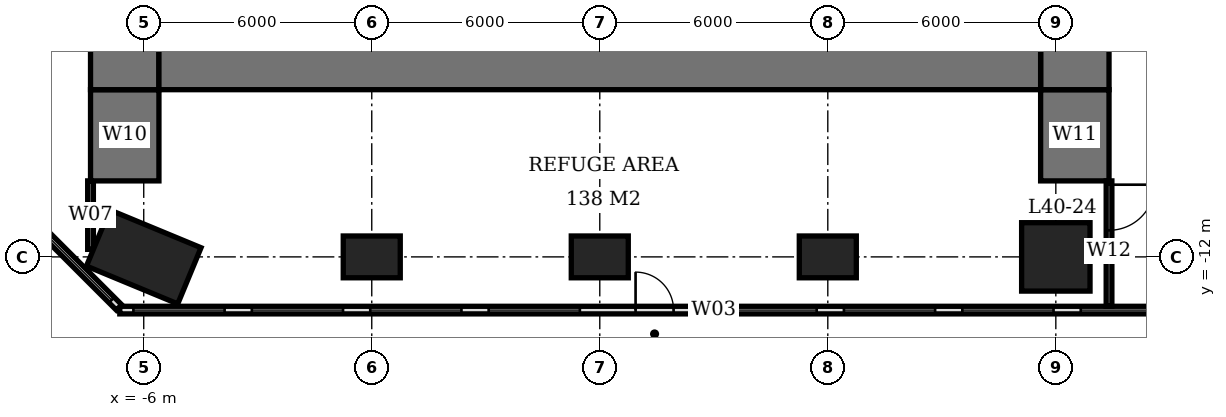
"""IFC4 building model, lengths in metres.
Left out: names, types, materials, properties, quantities, classifications, styles, units other than length and angle.
Written with IfcOpenShell. Run it as: python <this file> out.ifc"""

import sys

from ifc_helpers import new_model, si_unit, direction, frame, frame_2d, origin, origin_2d, place, context, subcontext, project, spatial, rectangle, extrude, element, fill, save


model = new_model("IFC4")
c1 = context("Model", 3, precision=1e-05, world=origin(), true_north=direction((0.0, 1.0)))
c2 = subcontext(c1, "Body", "Model", "MODEL_VIEW")
j1 = project(units=[si_unit("LENGTHUNIT", "METRE"), si_unit("PLANEANGLEUNIT", "RADIAN")], contexts=[c1])
p1 = place(None, origin())
s1 = spatial("IfcSite", under=j1, at=p1, CompositionType="ELEMENT")
p2 = place(p1, origin())
s2 = spatial("IfcBuilding", under=s1, at=p2, CompositionType="ELEMENT")
p3 = place(p2, frame((0.0, 0.0, 164.0)))
s3 = spatial("IfcBuildingStorey", under=s2, at=p3, CompositionType="ELEMENT", Elevation=164.0)
p4 = place(p3, frame((-6.0, -12.0, 0.0), z_axis=(0.0, 0.0, 1.0), x_axis=(-0.923879532511, 0.382683432365, 0.0)))
e1 = element("IfcColumn", 1, at=p4, inside=s3, PredefinedType="COLUMN", context=c2, shape_type="SweptSolid", body=[
    extrude(rectangle(XDim=2.6, YDim=1.6, at=origin_2d()), origin(), (0.0, 0.0, 1.0), 5.4),
])
for number, where, z_axis, x_axis in (
    (2, (0.0, -12.0, 0.0), (0.0, 0.0, 1.0), (1.0, 0.0, 0.0)),
    (3, (6.0, -12.0, 0.0), (0.0, 0.0, 1.0), (1.0, 0.0, 0.0)),
    (4, (12.0, -12.0, 0.0), (0.0, 0.0, 1.0), (1.0, 0.0, 0.0)),
):
    element("IfcColumn", number, at=place(p3, frame(where, z_axis=z_axis, x_axis=x_axis)), inside=s3, PredefinedType="COLUMN", context=c2, shape_type="SweptSolid", body=[
        extrude(rectangle(XDim=1.5, YDim=1.1, at=origin_2d()), origin(), (0.0, 0.0, 1.0), 5.4),
    ])
p5 = place(p3, frame((18.0, -12.0, 0.0), z_axis=(0.0, 0.0, 1.0), x_axis=(1.0, 0.0, 0.0)))
e5 = element("IfcColumn", 5, at=p5, inside=s3, PredefinedType="COLUMN", context=c2, shape_type="SweptSolid", body=[
    extrude(rectangle(XDim=1.8, YDim=1.8, at=origin_2d()), origin(), (0.0, 0.0, 1.0), 5.4),
])
p6 = place(p3, frame((-5.6, -6.6, 0.0), z_axis=(0.0, 0.0, 1.0), x_axis=(1.0, 0.0, 0.0)))
e6 = element("IfcWall", 6, at=p6, inside=s3, PredefinedType="SHEAR", context=c2, shape_type="SweptSolid", body=[
    extrude(rectangle(XDim=23.2, YDim=2.0, at=frame_2d((11.6, 0.0))), origin(), (0.0, 0.0, 1.0), 5.4),
])
p7 = place(p3, frame((-6.5, -7.6, 0.0), z_axis=(0.0, 0.0, 1.0), x_axis=(0.0, 1.0, 0.0)))
e7 = element("IfcWall", 7, at=p7, inside=s3, PredefinedType="SHEAR", context=c2, shape_type="SweptSolid", body=[
    extrude(rectangle(XDim=21.2, YDim=1.8, at=frame_2d((10.6, 0.0))), origin(), (0.0, 0.0, 1.0), 5.4),
])
p8 = place(p7, frame((7.8, 0.0, 0.0)))
e8 = element("IfcOpeningElement", 8, at=p8, cuts=e7, PredefinedType="OPENING", context=c2, shape_type="SweptSolid", body=[
    extrude(rectangle(XDim=1.8, YDim=2.4, at=frame_2d((0.9, 1.2))), frame((0.0, 0.91, 0.0), z_axis=(0.0, -1.0, 0.0), x_axis=(1.0, 0.0, 0.0)), (0.0, 0.0, 1.0), 1.82),
])
p9 = place(p3, frame((18.5, -7.6, 0.0), z_axis=(0.0, 0.0, 1.0), x_axis=(0.0, 1.0, 0.0)))
e9 = element("IfcWall", 9, at=p9, inside=s3, PredefinedType="SHEAR", context=c2, shape_type="SweptSolid", body=[
    extrude(rectangle(XDim=21.2, YDim=1.8, at=frame_2d((10.6, 0.0))), origin(), (0.0, 0.0, 1.0), 5.4),
])
p10 = place(p9, frame((9.2, 0.0, 0.0)))
e10 = element("IfcOpeningElement", 10, at=p10, cuts=e9, PredefinedType="OPENING", context=c2, shape_type="SweptSolid", body=[
    extrude(rectangle(XDim=1.8, YDim=2.4, at=frame_2d((0.9, 1.2))), frame((0.0, 0.91, 0.0), z_axis=(0.0, -1.0, 0.0), x_axis=(1.0, 0.0, 0.0)), (0.0, 0.0, 1.0), 1.82),
])
for number, where, z_axis, x_axis in (
    (11, (-6.5, -10.0, 0.0), (0.0, 0.0, 1.0), (0.0, 1.0, 0.0)),
    (12, (18.5, -10.0, 0.0), (0.0, 0.0, 1.0), (0.0, 1.0, 0.0)),
):
    element("IfcWall", number, at=place(p3, frame(where, z_axis=z_axis, x_axis=x_axis)), inside=s3, PredefinedType="SHEAR", context=c2, shape_type="SweptSolid", body=[
        extrude(rectangle(XDim=2.4, YDim=1.8, at=frame_2d((1.2, 0.0))), origin(), (0.0, 0.0, 1.0), 5.4),
    ])
p11 = place(p3, frame((-6.63, -13.4, 0.0), z_axis=(0.0, 0.0, 1.0), x_axis=(1.0, 0.0, 0.0)))
e13 = element("IfcWall", 13, at=p11, inside=s3, PredefinedType="USERDEFINED", context=c2, shape_type="SweptSolid", body=[
    extrude(rectangle(XDim=31.26, YDim=0.2, at=frame_2d((15.63, 0.0))), origin(), (0.0, 0.0, 1.0), 5.4),
])
p12 = place(p11, frame((0.358, 0.0, 0.6)))
e14 = element("IfcOpeningElement", 14, at=p12, cuts=e13, PredefinedType="OPENING", context=c2, shape_type="SweptSolid", body=[
    extrude(rectangle(XDim=2.4, YDim=3.0, at=frame_2d((1.2, 1.5))), frame((0.0, 0.11, 0.0), z_axis=(0.0, -1.0, 0.0), x_axis=(1.0, 0.0, 0.0)), (0.0, 0.0, 1.0), 0.22),
])
p13 = place(p11, frame((3.474, 0.0, 0.6)))
e15 = element("IfcOpeningElement", 15, at=p13, cuts=e13, PredefinedType="OPENING", context=c2, shape_type="SweptSolid", body=[
    extrude(rectangle(XDim=2.4, YDim=3.0, at=frame_2d((1.2, 1.5))), frame((0.0, 0.11, 0.0), z_axis=(0.0, -1.0, 0.0), x_axis=(1.0, 0.0, 0.0)), (0.0, 0.0, 1.0), 0.22),
])
p14 = place(p11, frame((6.59, 0.0, 0.6)))
e16 = element("IfcOpeningElement", 16, at=p14, cuts=e13, PredefinedType="OPENING", context=c2, shape_type="SweptSolid", body=[
    extrude(rectangle(XDim=2.4, YDim=3.0, at=frame_2d((1.2, 1.5))), frame((0.0, 0.11, 0.0), z_axis=(0.0, -1.0, 0.0), x_axis=(1.0, 0.0, 0.0)), (0.0, 0.0, 1.0), 0.22),
])
p15 = place(p11, frame((9.706, 0.0, 0.6)))
e17 = element("IfcOpeningElement", 17, at=p15, cuts=e13, PredefinedType="OPENING", context=c2, shape_type="SweptSolid", body=[
    extrude(rectangle(XDim=2.4, YDim=3.0, at=frame_2d((1.2, 1.5))), frame((0.0, 0.11, 0.0), z_axis=(0.0, -1.0, 0.0), x_axis=(1.0, 0.0, 0.0)), (0.0, 0.0, 1.0), 0.22),
])
p16 = place(p11, frame((13.572, 0.0, 0.0)))
e18 = element("IfcOpeningElement", 18, at=p16, cuts=e13, PredefinedType="OPENING", context=c2, shape_type="SweptSolid", body=[
    extrude(rectangle(XDim=1.0, YDim=2.1, at=frame_2d((0.5, 1.05))), frame((0.0, 0.11, 0.0), z_axis=(0.0, -1.0, 0.0), x_axis=(1.0, 0.0, 0.0)), (0.0, 0.0, 1.0), 0.22),
])
p17 = place(p11, frame((15.938, 0.0, 0.6)))
e19 = element("IfcOpeningElement", 19, at=p17, cuts=e13, PredefinedType="OPENING", context=c2, shape_type="SweptSolid", body=[
    extrude(rectangle(XDim=2.4, YDim=3.0, at=frame_2d((1.2, 1.5))), frame((0.0, 0.11, 0.0), z_axis=(0.0, -1.0, 0.0), x_axis=(1.0, 0.0, 0.0)), (0.0, 0.0, 1.0), 0.22),
])
p18 = place(p11, frame((19.054, 0.0, 0.6)))
e20 = element("IfcOpeningElement", 20, at=p18, cuts=e13, PredefinedType="OPENING", context=c2, shape_type="SweptSolid", body=[
    extrude(rectangle(XDim=2.4, YDim=3.0, at=frame_2d((1.2, 1.5))), frame((0.0, 0.11, 0.0), z_axis=(0.0, -1.0, 0.0), x_axis=(1.0, 0.0, 0.0)), (0.0, 0.0, 1.0), 0.22),
])
p19 = place(p11, frame((22.17, 0.0, 0.6)))
e21 = element("IfcOpeningElement", 21, at=p19, cuts=e13, PredefinedType="OPENING", context=c2, shape_type="SweptSolid", body=[
    extrude(rectangle(XDim=2.4, YDim=3.0, at=frame_2d((1.2, 1.5))), frame((0.0, 0.11, 0.0), z_axis=(0.0, -1.0, 0.0), x_axis=(1.0, 0.0, 0.0)), (0.0, 0.0, 1.0), 0.22),
])
p20 = place(p11, frame((25.286, 0.0, 0.6)))
e22 = element("IfcOpeningElement", 22, at=p20, cuts=e13, PredefinedType="OPENING", context=c2, shape_type="SweptSolid", body=[
    extrude(rectangle(XDim=2.4, YDim=3.0, at=frame_2d((1.2, 1.5))), frame((0.0, 0.11, 0.0), z_axis=(0.0, -1.0, 0.0), x_axis=(1.0, 0.0, 0.0)), (0.0, 0.0, 1.0), 0.22),
])
p21 = place(p11, frame((28.402, 0.0, 0.6)))
e23 = element("IfcOpeningElement", 23, at=p21, cuts=e13, PredefinedType="OPENING", context=c2, shape_type="SweptSolid", body=[
    extrude(rectangle(XDim=2.4, YDim=3.0, at=frame_2d((1.2, 1.5))), frame((0.0, 0.11, 0.0), z_axis=(0.0, -1.0, 0.0), x_axis=(1.0, 0.0, 0.0)), (0.0, 0.0, 1.0), 0.22),
])
p22 = place(p3, frame((-13.329, -6.651, 0.0), z_axis=(0.0, 0.0, 1.0), x_axis=(0.707106781187, -0.707106781187, 0.0)))
e24 = element("IfcWall", 24, at=p22, inside=s3, PredefinedType="USERDEFINED", context=c2, shape_type="SweptSolid", body=[
    extrude(rectangle(XDim=9.445, YDim=0.2, at=frame_2d((4.723, 0.0))), origin(), (0.0, 0.0, 1.0), 5.4),
])
p23 = place(p22, frame((0.274, 0.0, 0.6)))
e25 = element("IfcOpeningElement", 25, at=p23, cuts=e24, PredefinedType="OPENING", context=c2, shape_type="SweptSolid", body=[
    extrude(rectangle(XDim=2.6, YDim=3.0, at=frame_2d((1.3, 1.5))), frame((0.0, 0.11, 0.0), z_axis=(0.0, -1.0, 0.0), x_axis=(1.0, 0.0, 0.0)), (0.0, 0.0, 1.0), 0.22),
])
p24 = place(p22, frame((3.423, 0.0, 0.6)))
e26 = element("IfcOpeningElement", 26, at=p24, cuts=e24, PredefinedType="OPENING", context=c2, shape_type="SweptSolid", body=[
    extrude(rectangle(XDim=2.6, YDim=3.0, at=frame_2d((1.3, 1.5))), frame((0.0, 0.11, 0.0), z_axis=(0.0, -1.0, 0.0), x_axis=(1.0, 0.0, 0.0)), (0.0, 0.0, 1.0), 0.22),
])
p25 = place(p22, frame((6.571, 0.0, 0.6)))
e27 = element("IfcOpeningElement", 27, at=p25, cuts=e24, PredefinedType="OPENING", context=c2, shape_type="SweptSolid", body=[
    extrude(rectangle(XDim=2.6, YDim=3.0, at=frame_2d((1.3, 1.5))), frame((0.0, 0.11, 0.0), z_axis=(0.0, -1.0, 0.0), x_axis=(1.0, 0.0, 0.0)), (0.0, 0.0, 1.0), 0.22),
])
p26 = place(p3, frame((-7.4, -11.802, 0.0), z_axis=(0.0, 0.0, 1.0), x_axis=(0.0, 1.0, 0.0)))
e28 = element("IfcWall", 28, at=p26, inside=s3, PredefinedType="PARTITIONING", context=c2, shape_type="SweptSolid", body=[
    extrude(rectangle(XDim=1.802, YDim=0.15, at=frame_2d((0.901, 0.0))), origin(), (0.0, 0.0, 1.0), 5.15),
])
p27 = place(p3, frame((19.4, -10.0, 0.0), z_axis=(0.0, 0.0, 1.0), x_axis=(0.0, -1.0, 0.0)))
e29 = element("IfcWall", 29, at=p27, inside=s3, PredefinedType="PARTITIONING", context=c2, shape_type="SweptSolid", body=[
    extrude(rectangle(XDim=3.3, YDim=0.15, at=frame_2d((1.65, 0.0))), origin(), (0.0, 0.0, 1.0), 5.15),
])
p28 = place(p27, frame((0.1, 0.0, 0.0)))
e30 = element("IfcOpeningElement", 30, at=p28, cuts=e29, PredefinedType="OPENING", context=c2, shape_type="SweptSolid", body=[
    extrude(rectangle(XDim=1.2, YDim=2.4, at=frame_2d((0.6, 1.2))), frame((0.0, 0.085, 0.0), z_axis=(0.0, -1.0, 0.0), x_axis=(1.0, 0.0, 0.0)), (0.0, 0.0, 1.0), 0.17),
])
p29 = place(p12, origin())
e31 = element("IfcWindow", 31, at=p29, inside=s3, PartitioningType="SINGLE_PANEL", PredefinedType="USERDEFINED", context=c2, shape_type="SweptSolid", body=[
    extrude(rectangle(XDim=2.4, YDim=3.0, at=frame_2d((1.2, 1.5))), frame((0.0, 0.03, 0.0), z_axis=(0.0, -1.0, 0.0), x_axis=(1.0, 0.0, 0.0)), (0.0, 0.0, 1.0), 0.06),
])
fill(e14, e31)
p30 = place(p13, origin())
e32 = element("IfcWindow", 32, at=p30, inside=s3, PartitioningType="SINGLE_PANEL", PredefinedType="USERDEFINED", context=c2, shape_type="SweptSolid", body=[
    extrude(rectangle(XDim=2.4, YDim=3.0, at=frame_2d((1.2, 1.5))), frame((0.0, 0.03, 0.0), z_axis=(0.0, -1.0, 0.0), x_axis=(1.0, 0.0, 0.0)), (0.0, 0.0, 1.0), 0.06),
])
fill(e15, e32)
p31 = place(p14, origin())
e33 = element("IfcWindow", 33, at=p31, inside=s3, PartitioningType="SINGLE_PANEL", PredefinedType="USERDEFINED", context=c2, shape_type="SweptSolid", body=[
    extrude(rectangle(XDim=2.4, YDim=3.0, at=frame_2d((1.2, 1.5))), frame((0.0, 0.03, 0.0), z_axis=(0.0, -1.0, 0.0), x_axis=(1.0, 0.0, 0.0)), (0.0, 0.0, 1.0), 0.06),
])
fill(e16, e33)
p32 = place(p15, origin())
e34 = element("IfcWindow", 34, at=p32, inside=s3, PartitioningType="SINGLE_PANEL", PredefinedType="USERDEFINED", context=c2, shape_type="SweptSolid", body=[
    extrude(rectangle(XDim=2.4, YDim=3.0, at=frame_2d((1.2, 1.5))), frame((0.0, 0.03, 0.0), z_axis=(0.0, -1.0, 0.0), x_axis=(1.0, 0.0, 0.0)), (0.0, 0.0, 1.0), 0.06),
])
fill(e17, e34)
p33 = place(p16, origin())
e35 = element("IfcDoor", 35, at=p33, inside=s3, OperationType="SINGLE_SWING_LEFT", PredefinedType="DOOR", context=c2, shape_type="SweptSolid", body=[
    extrude(rectangle(XDim=1.0, YDim=2.1, at=frame_2d((0.5, 1.05))), frame((0.0, 0.025, 0.0), z_axis=(0.0, -1.0, 0.0), x_axis=(1.0, 0.0, 0.0)), (0.0, 0.0, 1.0), 0.05),
])
fill(e18, e35)
p34 = place(p17, origin())
e36 = element("IfcWindow", 36, at=p34, inside=s3, PartitioningType="SINGLE_PANEL", PredefinedType="USERDEFINED", context=c2, shape_type="SweptSolid", body=[
    extrude(rectangle(XDim=2.4, YDim=3.0, at=frame_2d((1.2, 1.5))), frame((0.0, 0.03, 0.0), z_axis=(0.0, -1.0, 0.0), x_axis=(1.0, 0.0, 0.0)), (0.0, 0.0, 1.0), 0.06),
])
fill(e19, e36)
p35 = place(p18, origin())
e37 = element("IfcWindow", 37, at=p35, inside=s3, PartitioningType="SINGLE_PANEL", PredefinedType="USERDEFINED", context=c2, shape_type="SweptSolid", body=[
    extrude(rectangle(XDim=2.4, YDim=3.0, at=frame_2d((1.2, 1.5))), frame((0.0, 0.03, 0.0), z_axis=(0.0, -1.0, 0.0), x_axis=(1.0, 0.0, 0.0)), (0.0, 0.0, 1.0), 0.06),
])
fill(e20, e37)
p36 = place(p19, origin())
e38 = element("IfcWindow", 38, at=p36, inside=s3, PartitioningType="SINGLE_PANEL", PredefinedType="USERDEFINED", context=c2, shape_type="SweptSolid", body=[
    extrude(rectangle(XDim=2.4, YDim=3.0, at=frame_2d((1.2, 1.5))), frame((0.0, 0.03, 0.0), z_axis=(0.0, -1.0, 0.0), x_axis=(1.0, 0.0, 0.0)), (0.0, 0.0, 1.0), 0.06),
])
fill(e21, e38)
p37 = place(p20, origin())
e39 = element("IfcWindow", 39, at=p37, inside=s3, PartitioningType="SINGLE_PANEL", PredefinedType="USERDEFINED", context=c2, shape_type="SweptSolid", body=[
    extrude(rectangle(XDim=2.4, YDim=3.0, at=frame_2d((1.2, 1.5))), frame((0.0, 0.03, 0.0), z_axis=(0.0, -1.0, 0.0), x_axis=(1.0, 0.0, 0.0)), (0.0, 0.0, 1.0), 0.06),
])
fill(e22, e39)
p38 = place(p25, origin())
e40 = element("IfcWindow", 40, at=p38, inside=s3, PartitioningType="SINGLE_PANEL", PredefinedType="USERDEFINED", context=c2, shape_type="SweptSolid", body=[
    extrude(rectangle(XDim=2.6, YDim=3.0, at=frame_2d((1.3, 1.5))), frame((0.0, 0.03, 0.0), z_axis=(0.0, -1.0, 0.0), x_axis=(1.0, 0.0, 0.0)), (0.0, 0.0, 1.0), 0.06),
])
fill(e27, e40)
p39 = place(p28, origin())
e41 = element("IfcDoor", 41, at=p39, inside=s3, OperationType="SINGLE_SWING_LEFT", PredefinedType="DOOR", context=c2, shape_type="SweptSolid", body=[
    extrude(rectangle(XDim=1.2, YDim=2.4, at=frame_2d((0.6, 1.2))), frame((0.0, 0.025, 0.0), z_axis=(0.0, -1.0, 0.0), x_axis=(1.0, 0.0, 0.0)), (0.0, 0.0, 1.0), 0.05),
])
fill(e30, e41)
save(model, sys.argv[1])
